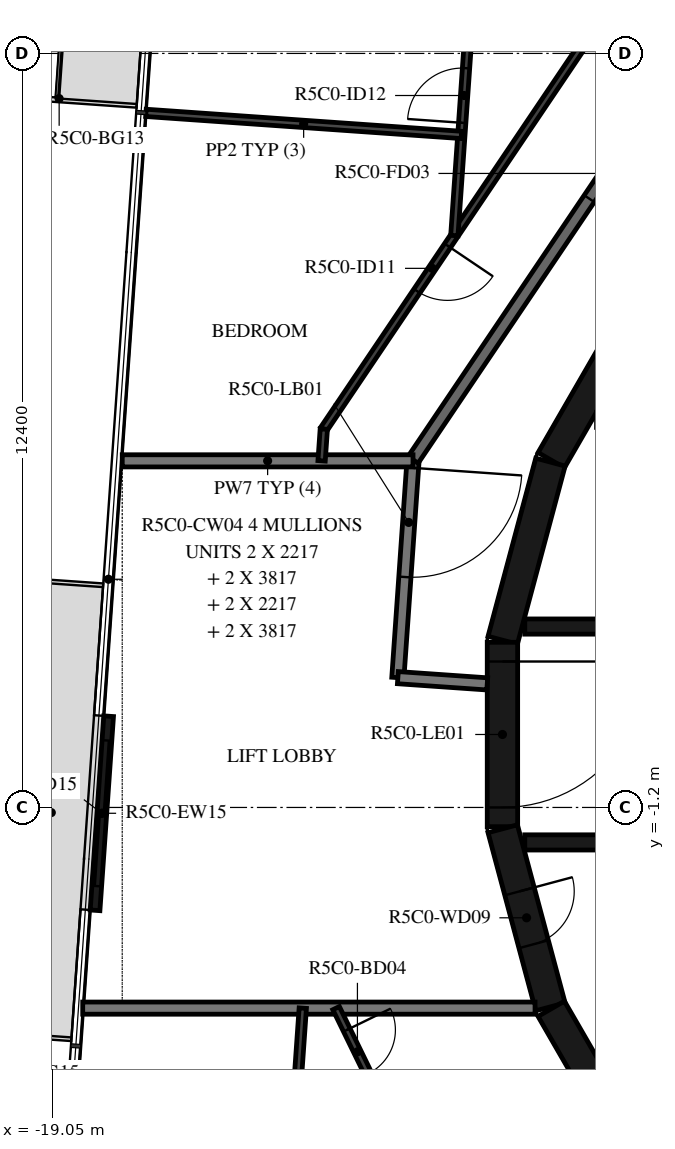
"""IFC4 building model, lengths in metres.
Left out: names, types, materials, properties, quantities, classifications, styles, units other than length and angle.
Written with IfcOpenShell. Run it as: python <this file> out.ifc"""

import sys

from ifc_helpers import new_model, si_unit, direction, frame, frame_2d, origin, place, context, subcontext, project, spatial, rectangle, extrude, element, fill, save


model = new_model("IFC4")
c1 = context("Model", 3, precision=1e-05, world=origin(), true_north=direction((0.0, 1.0)))
c2 = subcontext(c1, "Body", "Model", "MODEL_VIEW")
j1 = project(units=[si_unit("LENGTHUNIT", "METRE"), si_unit("PLANEANGLEUNIT", "RADIAN")], contexts=[c1])
p1 = place(None, origin())
s1 = spatial("IfcSite", under=j1, at=p1, CompositionType="ELEMENT")
p2 = place(p1, origin())
s2 = spatial("IfcBuilding", under=s1, at=p2, CompositionType="ELEMENT")
p3 = place(p2, frame((0.0, 0.0, 209.4)))
s3 = spatial("IfcBuildingStorey", under=s2, at=p3, CompositionType="ELEMENT", Elevation=209.4)
p4 = place(p3, frame((-18.124, 0.301, 0.0), z_axis=(0.0, 0.0, 1.0), x_axis=(-0.069728915792, -0.997565976917, 0.0)))
e1 = element("IfcWall", 1, at=p4, inside=s3, PredefinedType="STANDARD", context=c2, shape_type="SweptSolid", body=[
    extrude(rectangle(XDim=3.2, YDim=0.16, at=frame_2d((1.6, 0.0))), origin(), (0.0, 0.0, 1.0), 3.12),
])
p5 = place(p4, frame((0.4, 0.0, 0.0)))
e2 = element("IfcOpeningElement", 2, at=p5, cuts=e1, PredefinedType="OPENING", context=c2, shape_type="SweptSolid", body=[
    extrude(rectangle(XDim=2.4, YDim=2.4, at=frame_2d((1.2, 1.2))), frame((0.0, 0.09, 0.0), z_axis=(0.0, -1.0, 0.0), x_axis=(1.0, 0.0, 0.0)), (0.0, 0.0, 1.0), 0.18),
])
for number, where, z_axis, x_axis in (
    (3, (-9.329, 7.137, 0.0), (0.0, 0.0, 1.0), (-0.5, -0.866, 0.0)),
    (4, (-10.858, 4.479, 0.0), (0.0, 0.0, 1.0), (-0.259, -0.966, 0.0)),
):
    element("IfcWall", number, at=place(p3, frame(where, z_axis=z_axis, x_axis=x_axis)), inside=s3, PredefinedType="SHEAR", context=c2, shape_type="SweptSolid", body=[
        extrude(rectangle(XDim=3.033, YDim=0.5, at=frame_2d((1.516, 0.0))), origin(), (0.0, 0.0, 1.0), 3.12),
    ])
p6 = place(p3, frame((-11.647, 1.516, 0.0), z_axis=(0.0, 0.0, 1.0), x_axis=(0.0, -1.0, 0.0)))
e5 = element("IfcWall", 5, at=p6, inside=s3, PredefinedType="SHEAR", context=c2, shape_type="SweptSolid", body=[
    extrude(rectangle(XDim=3.033, YDim=0.5, at=frame_2d((1.516, 0.0))), origin(), (0.0, 0.0, 1.0), 3.12),
])
p7 = place(p6, frame((0.316, 0.0, 0.0)))
e6 = element("IfcOpeningElement", 6, at=p7, cuts=e5, PredefinedType="OPENING", context=c2, shape_type="SweptSolid", body=[
    extrude(rectangle(XDim=2.4, YDim=2.1, at=frame_2d((1.2, 1.05))), frame((0.0, 0.26, 0.0), z_axis=(0.0, -1.0, 0.0), x_axis=(1.0, 0.0, 0.0)), (0.0, 0.0, 1.0), 0.52),
])
p8 = place(p3, frame((-11.643, -1.55, 0.0), z_axis=(0.0, 0.0, 1.0), x_axis=(0.258734743916, -0.965948410781, 0.0)))
e7 = element("IfcWall", 7, at=p8, inside=s3, PredefinedType="SHEAR", context=c2, shape_type="SweptSolid", body=[
    extrude(rectangle(XDim=3.033, YDim=0.5, at=frame_2d((1.516, 0.0))), origin(), (0.0, 0.0, 1.0), 3.12),
])
p9 = place(p8, frame((1.066, 0.0, 0.0)))
e8 = element("IfcOpeningElement", 8, at=p9, cuts=e7, PredefinedType="OPENING", context=c2, shape_type="SweptSolid", body=[
    extrude(rectangle(XDim=0.9, YDim=2.1, at=frame_2d((0.45, 1.05))), frame((0.0, 0.26, 0.0), z_axis=(0.0, -1.0, 0.0), x_axis=(1.0, 0.0, 0.0)), (0.0, 0.0, 1.0), 0.52),
])
p10 = place(p3, frame((-10.845, -4.51, 0.0), z_axis=(0.0, 0.0, 1.0), x_axis=(0.500087131594, -0.865975092491, 0.0)))
e9 = element("IfcWall", 9, at=p10, inside=s3, PredefinedType="SHEAR", context=c2, shape_type="SweptSolid", body=[
    extrude(rectangle(XDim=3.033, YDim=0.5, at=frame_2d((1.516, 0.0))), origin(), (0.0, 0.0, 1.0), 3.12),
])
p11 = place(p3, frame((-11.28, 1.775, 0.0), z_axis=(0.0, 0.0, 1.0), x_axis=(1.0, 0.0, 0.0)))
e10 = element("IfcWall", 10, at=p11, inside=s3, PredefinedType="SHEAR", context=c2, shape_type="SweptSolid", body=[
    extrude(rectangle(XDim=14.38, YDim=0.25, at=frame_2d((7.19, 0.0))), origin(), (0.0, 0.0, 1.0), 3.12),
])
p12 = place(p11, frame((10.73, 0.0, 0.0)))
e11 = element("IfcOpeningElement", 11, at=p12, cuts=e10, PredefinedType="OPENING", context=c2, shape_type="SweptSolid", body=[
    extrude(rectangle(XDim=1.1, YDim=2.1, at=frame_2d((0.55, 1.05))), frame((0.0, 0.135, 0.0), z_axis=(0.0, -1.0, 0.0), x_axis=(1.0, 0.0, 0.0)), (0.0, 0.0, 1.0), 0.27),
])
p13 = place(p11, frame((12.88, 0.0, 0.0)))
e12 = element("IfcOpeningElement", 12, at=p13, cuts=e10, PredefinedType="OPENING", context=c2, shape_type="SweptSolid", body=[
    extrude(rectangle(XDim=1.1, YDim=2.1, at=frame_2d((0.55, 1.05))), frame((0.0, 0.135, 0.0), z_axis=(0.0, -1.0, 0.0), x_axis=(1.0, 0.0, 0.0)), (0.0, 0.0, 1.0), 0.27),
])
p14 = place(p11, frame((3.305, 0.0, 0.0)))
e13 = element("IfcOpeningElement", 13, at=p14, cuts=e10, PredefinedType="OPENING", context=c2, shape_type="SweptSolid", body=[
    extrude(rectangle(XDim=0.9, YDim=2.1, at=frame_2d((0.45, 1.05))), frame((0.0, 0.135, 0.0), z_axis=(0.0, -1.0, 0.0), x_axis=(1.0, 0.0, 0.0)), (0.0, 0.0, 1.0), 0.27),
])
p15 = place(p11, frame((7.605, 0.0, 0.0)))
e14 = element("IfcOpeningElement", 14, at=p15, cuts=e10, PredefinedType="OPENING", context=c2, shape_type="SweptSolid", body=[
    extrude(rectangle(XDim=0.9, YDim=2.1, at=frame_2d((0.45, 1.05))), frame((0.0, 0.135, 0.0), z_axis=(0.0, -1.0, 0.0), x_axis=(1.0, 0.0, 0.0)), (0.0, 0.0, 1.0), 0.27),
])
p16 = place(p3, frame((-11.28, -1.775, 0.0), z_axis=(0.0, 0.0, 1.0), x_axis=(1.0, 0.0, 0.0)))
e15 = element("IfcWall", 15, at=p16, inside=s3, PredefinedType="SHEAR", context=c2, shape_type="SweptSolid", body=[
    extrude(rectangle(XDim=14.38, YDim=0.25, at=frame_2d((7.19, 0.0))), origin(), (0.0, 0.0, 1.0), 3.12),
])
p17 = place(p16, frame((12.88, 0.0, 0.0)))
e16 = element("IfcOpeningElement", 16, at=p17, cuts=e15, PredefinedType="OPENING", context=c2, shape_type="SweptSolid", body=[
    extrude(rectangle(XDim=1.1, YDim=2.1, at=frame_2d((0.55, 1.05))), frame((0.0, 0.135, 0.0), z_axis=(0.0, -1.0, 0.0), x_axis=(1.0, 0.0, 0.0)), (0.0, 0.0, 1.0), 0.27),
])
p18 = place(p16, frame((8.68, 0.0, 0.0)))
e17 = element("IfcOpeningElement", 17, at=p18, cuts=e15, PredefinedType="OPENING", context=c2, shape_type="SweptSolid", body=[
    extrude(rectangle(XDim=0.9, YDim=2.1, at=frame_2d((0.45, 1.05))), frame((0.0, 0.135, 0.0), z_axis=(0.0, -1.0, 0.0), x_axis=(1.0, 0.0, 0.0)), (0.0, 0.0, 1.0), 0.27),
])
p19 = place(p3, frame((-13.118, 4.5, 0.0), z_axis=(0.0, 0.0, 1.0), x_axis=(-0.069746872611, -0.99756472159, 0.0)))
e18 = element("IfcWall", 18, at=p19, inside=s3, PredefinedType="STANDARD", context=c2, shape_type="SweptSolid", body=[
    extrude(rectangle(XDim=3.574, YDim=0.2, at=frame_2d((1.787, 0.0))), origin(), (0.0, 0.0, 1.0), 3.12),
])
p20 = place(p19, frame((0.115, 0.0, 0.0)))
e19 = element("IfcOpeningElement", 19, at=p20, cuts=e18, PredefinedType="OPENING", context=c2, shape_type="SweptSolid", body=[
    extrude(rectangle(XDim=1.8, YDim=2.1, at=frame_2d((0.9, 1.05))), frame((0.0, 0.11, 0.0), z_axis=(0.0, -1.0, 0.0), x_axis=(1.0, 0.0, 0.0)), (0.0, 0.0, 1.0), 0.22),
])
p21 = place(p3, frame((-13.367, 0.935, 0.0), z_axis=(0.0, 0.0, 1.0), x_axis=(0.997553656289, -0.069904955655, 0.0)))
e20 = element("IfcWall", 20, at=p21, inside=s3, PredefinedType="STANDARD", context=c2, shape_type="SweptSolid", body=[
    extrude(rectangle(XDim=1.474, YDim=0.2, at=frame_2d((0.737, 0.0))), origin(), (0.0, 0.0, 1.0), 3.12),
])
p22 = place(p3, frame((-9.101, 10.47, 0.0), z_axis=(0.0, 0.0, 1.0), x_axis=(-0.559195469534, -0.829035841718, 0.0)))
e21 = element("IfcWall", 21, at=p22, inside=s3, PredefinedType="STANDARD", context=c2, shape_type="SweptSolid", body=[
    extrude(rectangle(XDim=7.181, YDim=0.2, at=frame_2d((3.591, 0.0))), origin(), (0.0, 0.0, 1.0), 3.12),
])
p23 = place(p22, frame((1.0, 0.0, 0.0)))
e22 = element("IfcOpeningElement", 22, at=p23, cuts=e21, PredefinedType="OPENING", context=c2, shape_type="SweptSolid", body=[
    extrude(rectangle(XDim=1.0, YDim=2.1, at=frame_2d((0.5, 1.05))), frame((0.0, 0.11, 0.0), z_axis=(0.0, -1.0, 0.0), x_axis=(1.0, 0.0, 0.0)), (0.0, 0.0, 1.0), 0.22),
])
p24 = place(p3, frame((-13.118, 4.5, 0.0), z_axis=(0.0, 0.0, 1.0), x_axis=(-1.0, 0.0, 0.0)))
e23 = element("IfcWall", 23, at=p24, inside=s3, PredefinedType="STANDARD", context=c2, shape_type="SweptSolid", body=[
    extrude(rectangle(XDim=4.782, YDim=0.2, at=frame_2d((2.391, 0.0))), origin(), (0.0, 0.0, 1.0), 3.12),
])
p25 = place(p3, frame((-18.55, -4.5, 0.0), z_axis=(0.0, 0.0, 1.0), x_axis=(1.0, 0.0, 0.0)))
e24 = element("IfcWall", 24, at=p25, inside=s3, PredefinedType="STANDARD", context=c2, shape_type="SweptSolid", body=[
    extrude(rectangle(XDim=7.438, YDim=0.2, at=frame_2d((3.719, 0.0))), origin(), (0.0, 0.0, 1.0), 3.12),
])
p26 = place(p3, frame((-10.12, 11.642, 0.0), z_axis=(0.0, 0.0, 1.0), x_axis=(-0.55920080659, -0.829032241779, 0.0)))
e25 = element("IfcWall", 25, at=p26, inside=s3, PredefinedType="PARTITIONING", context=c2, shape_type="SweptSolid", body=[
    extrude(rectangle(XDim=7.985, YDim=0.12, at=frame_2d((3.992, 0.0))), origin(), (0.0, 0.0, 1.0), 3.12),
])
p27 = place(p26, frame((4.346, 0.0, 0.0)))
e26 = element("IfcOpeningElement", 26, at=p27, cuts=e25, PredefinedType="OPENING", context=c2, shape_type="SweptSolid", body=[
    extrude(rectangle(XDim=0.9, YDim=2.1, at=frame_2d((0.45, 1.05))), frame((0.0, 0.07, 0.0), z_axis=(0.0, -1.0, 0.0), x_axis=(1.0, 0.0, 0.0)), (0.0, 0.0, 1.0), 0.14),
])
p28 = place(p3, frame((-14.585, 5.022, 0.0), z_axis=(0.0, 0.0, 1.0), x_axis=(-0.069490327804, -0.997582625321, 0.0)))
e27 = element("IfcWall", 27, at=p28, inside=s3, PredefinedType="PARTITIONING", context=c2, shape_type="SweptSolid", body=[
    extrude(rectangle(XDim=0.523, YDim=0.12, at=frame_2d((0.262, 0.0))), origin(), (0.0, 0.0, 1.0), 3.12),
])
p29 = place(p3, frame((-12.439, 8.204, 0.0), z_axis=(0.0, 0.0, 1.0), x_axis=(0.069750037523, 0.997564500303, 0.0)))
e28 = element("IfcWall", 28, at=p29, inside=s3, PredefinedType="PARTITIONING", context=c2, shape_type="SweptSolid", body=[
    extrude(rectangle(XDim=10.014, YDim=0.12, at=frame_2d((5.007, 0.0))), origin(), (0.0, 0.0, 1.0), 3.12),
])
p30 = place(p29, frame((1.859, 0.0, 0.0)))
e29 = element("IfcOpeningElement", 29, at=p30, cuts=e28, PredefinedType="OPENING", context=c2, shape_type="SweptSolid", body=[
    extrude(rectangle(XDim=0.9, YDim=2.1, at=frame_2d((0.45, 1.05))), frame((0.0, 0.07, 0.0), z_axis=(0.0, -1.0, 0.0), x_axis=(1.0, 0.0, 0.0)), (0.0, 0.0, 1.0), 0.14),
])
p31 = place(p3, frame((-17.51, 10.222, 0.0), z_axis=(0.0, 0.0, 1.0), x_axis=(0.997563184303, -0.069768856397, 0.0)))
e30 = element("IfcWall", 30, at=p31, inside=s3, PredefinedType="PARTITIONING", context=c2, shape_type="SweptSolid", body=[
    extrude(rectangle(XDim=5.2, YDim=0.12, at=frame_2d((2.6, 0.0))), origin(), (0.0, 0.0, 1.0), 2.73),
])
p32 = place(p3, frame((-14.383, -4.5, 0.0), z_axis=(0.0, 0.0, 1.0), x_axis=(0.438393414895, -0.898783185077, 0.0)))
e31 = element("IfcWall", 31, at=p32, inside=s3, PredefinedType="PARTITIONING", context=c2, shape_type="SweptSolid", body=[
    extrude(rectangle(XDim=6.049, YDim=0.12, at=frame_2d((3.024, 0.0))), origin(), (0.0, 0.0, 1.0), 3.12),
])
p33 = place(p32, frame((0.4, 0.0, 0.0)))
e32 = element("IfcOpeningElement", 32, at=p33, cuts=e31, PredefinedType="OPENING", context=c2, shape_type="SweptSolid", body=[
    extrude(rectangle(XDim=0.8, YDim=2.1, at=frame_2d((0.4, 1.05))), frame((0.0, 0.07, 0.0), z_axis=(0.0, -1.0, 0.0), x_axis=(1.0, 0.0, 0.0)), (0.0, 0.0, 1.0), 0.14),
])
p34 = place(p3, frame((-14.931, -4.5, 0.0), z_axis=(0.0, 0.0, 1.0), x_axis=(-0.069751708439, -0.997564383471, 0.0)))
e33 = element("IfcWall", 33, at=p34, inside=s3, PredefinedType="PARTITIONING", context=c2, shape_type="SweptSolid", body=[
    extrude(rectangle(XDim=11.894, YDim=0.12, at=frame_2d((5.947, 0.0))), origin(), (0.0, 0.0, 1.0), 3.12),
])
p35 = place(p34, frame((5.4, 0.0, 0.0)))
e34 = element("IfcOpeningElement", 34, at=p35, cuts=e33, PredefinedType="OPENING", context=c2, shape_type="SweptSolid", body=[
    extrude(rectangle(XDim=0.9, YDim=2.1, at=frame_2d((0.45, 1.05))), frame((0.0, 0.07, 0.0), z_axis=(0.0, -1.0, 0.0), x_axis=(1.0, 0.0, 0.0)), (0.0, 0.0, 1.0), 0.14),
])
p36 = place(p5, origin())
e35 = element("IfcDoor", 35, at=p36, inside=s3, OperationType="DOUBLE_DOOR_SLIDING", PredefinedType="DOOR", context=c2, shape_type="SweptSolid", body=[
    extrude(rectangle(XDim=2.4, YDim=2.4, at=frame_2d((1.2, 1.2))), frame((0.0, 0.025, 0.0), z_axis=(0.0, -1.0, 0.0), x_axis=(1.0, 0.0, 0.0)), (0.0, 0.0, 1.0), 0.05),
])
fill(e2, e35)
p37 = place(p7, origin())
e36 = element("IfcDoor", 36, at=p37, inside=s3, OperationType="DOUBLE_DOOR_SINGLE_SWING", PredefinedType="DOOR", context=c2, shape_type="SweptSolid", body=[
    extrude(rectangle(XDim=2.4, YDim=2.1, at=frame_2d((1.2, 1.05))), frame((0.0, 0.025, 0.0), z_axis=(0.0, -1.0, 0.0), x_axis=(1.0, 0.0, 0.0)), (0.0, 0.0, 1.0), 0.05),
])
fill(e6, e36)
p38 = place(p9, origin())
e37 = element("IfcDoor", 37, at=p38, inside=s3, OperationType="SINGLE_SWING_LEFT", PredefinedType="DOOR", context=c2, shape_type="SweptSolid", body=[
    extrude(rectangle(XDim=0.9, YDim=2.1, at=frame_2d((0.45, 1.05))), frame((0.0, 0.025, 0.0), z_axis=(0.0, -1.0, 0.0), x_axis=(1.0, 0.0, 0.0)), (0.0, 0.0, 1.0), 0.05),
])
fill(e8, e37)
p39 = place(p23, origin())
e38 = element("IfcDoor", 38, at=p39, inside=s3, OperationType="SINGLE_SWING_LEFT", PredefinedType="DOOR", context=c2, shape_type="SweptSolid", body=[
    extrude(rectangle(XDim=1.0, YDim=2.1, at=frame_2d((0.5, 1.05))), frame((0.0, 0.025, 0.0), z_axis=(0.0, -1.0, 0.0), x_axis=(1.0, 0.0, 0.0)), (0.0, 0.0, 1.0), 0.05),
])
fill(e22, e38)
p40 = place(p27, origin())
e39 = element("IfcDoor", 39, at=p40, inside=s3, OperationType="SINGLE_SWING_LEFT", PredefinedType="DOOR", context=c2, shape_type="SweptSolid", body=[
    extrude(rectangle(XDim=0.9, YDim=2.1, at=frame_2d((0.45, 1.05))), frame((0.0, 0.025, 0.0), z_axis=(0.0, -1.0, 0.0), x_axis=(1.0, 0.0, 0.0)), (0.0, 0.0, 1.0), 0.05),
])
fill(e26, e39)
p41 = place(p30, origin())
e40 = element("IfcDoor", 40, at=p41, inside=s3, OperationType="SINGLE_SWING_LEFT", PredefinedType="DOOR", context=c2, shape_type="SweptSolid", body=[
    extrude(rectangle(XDim=0.9, YDim=2.1, at=frame_2d((0.45, 1.05))), frame((0.0, 0.025, 0.0), z_axis=(0.0, -1.0, 0.0), x_axis=(1.0, 0.0, 0.0)), (0.0, 0.0, 1.0), 0.05),
])
fill(e29, e40)
p42 = place(p33, origin())
e41 = element("IfcDoor", 41, at=p42, inside=s3, OperationType="SINGLE_SWING_RIGHT", PredefinedType="DOOR", context=c2, shape_type="SweptSolid", body=[
    extrude(rectangle(XDim=0.8, YDim=2.1, at=frame_2d((0.4, 1.05))), frame((0.0, 0.025, 0.0), z_axis=(0.0, -1.0, 0.0), x_axis=(1.0, 0.0, 0.0)), (0.0, 0.0, 1.0), 0.05),
])
fill(e32, e41)
p43 = place(p20, origin())
e42 = element("IfcDoor", 42, at=p43, inside=s3, OperationType="DOUBLE_DOOR_SINGLE_SWING", PredefinedType="DOOR", context=c2, shape_type="SweptSolid", body=[
    extrude(rectangle(XDim=1.8, YDim=2.1, at=frame_2d((0.9, 1.05))), frame((0.0, 0.025, 0.0), z_axis=(0.0, -1.0, 0.0), x_axis=(1.0, 0.0, 0.0)), (0.0, 0.0, 1.0), 0.05),
])
fill(e19, e42)
save(model, sys.argv[1])
